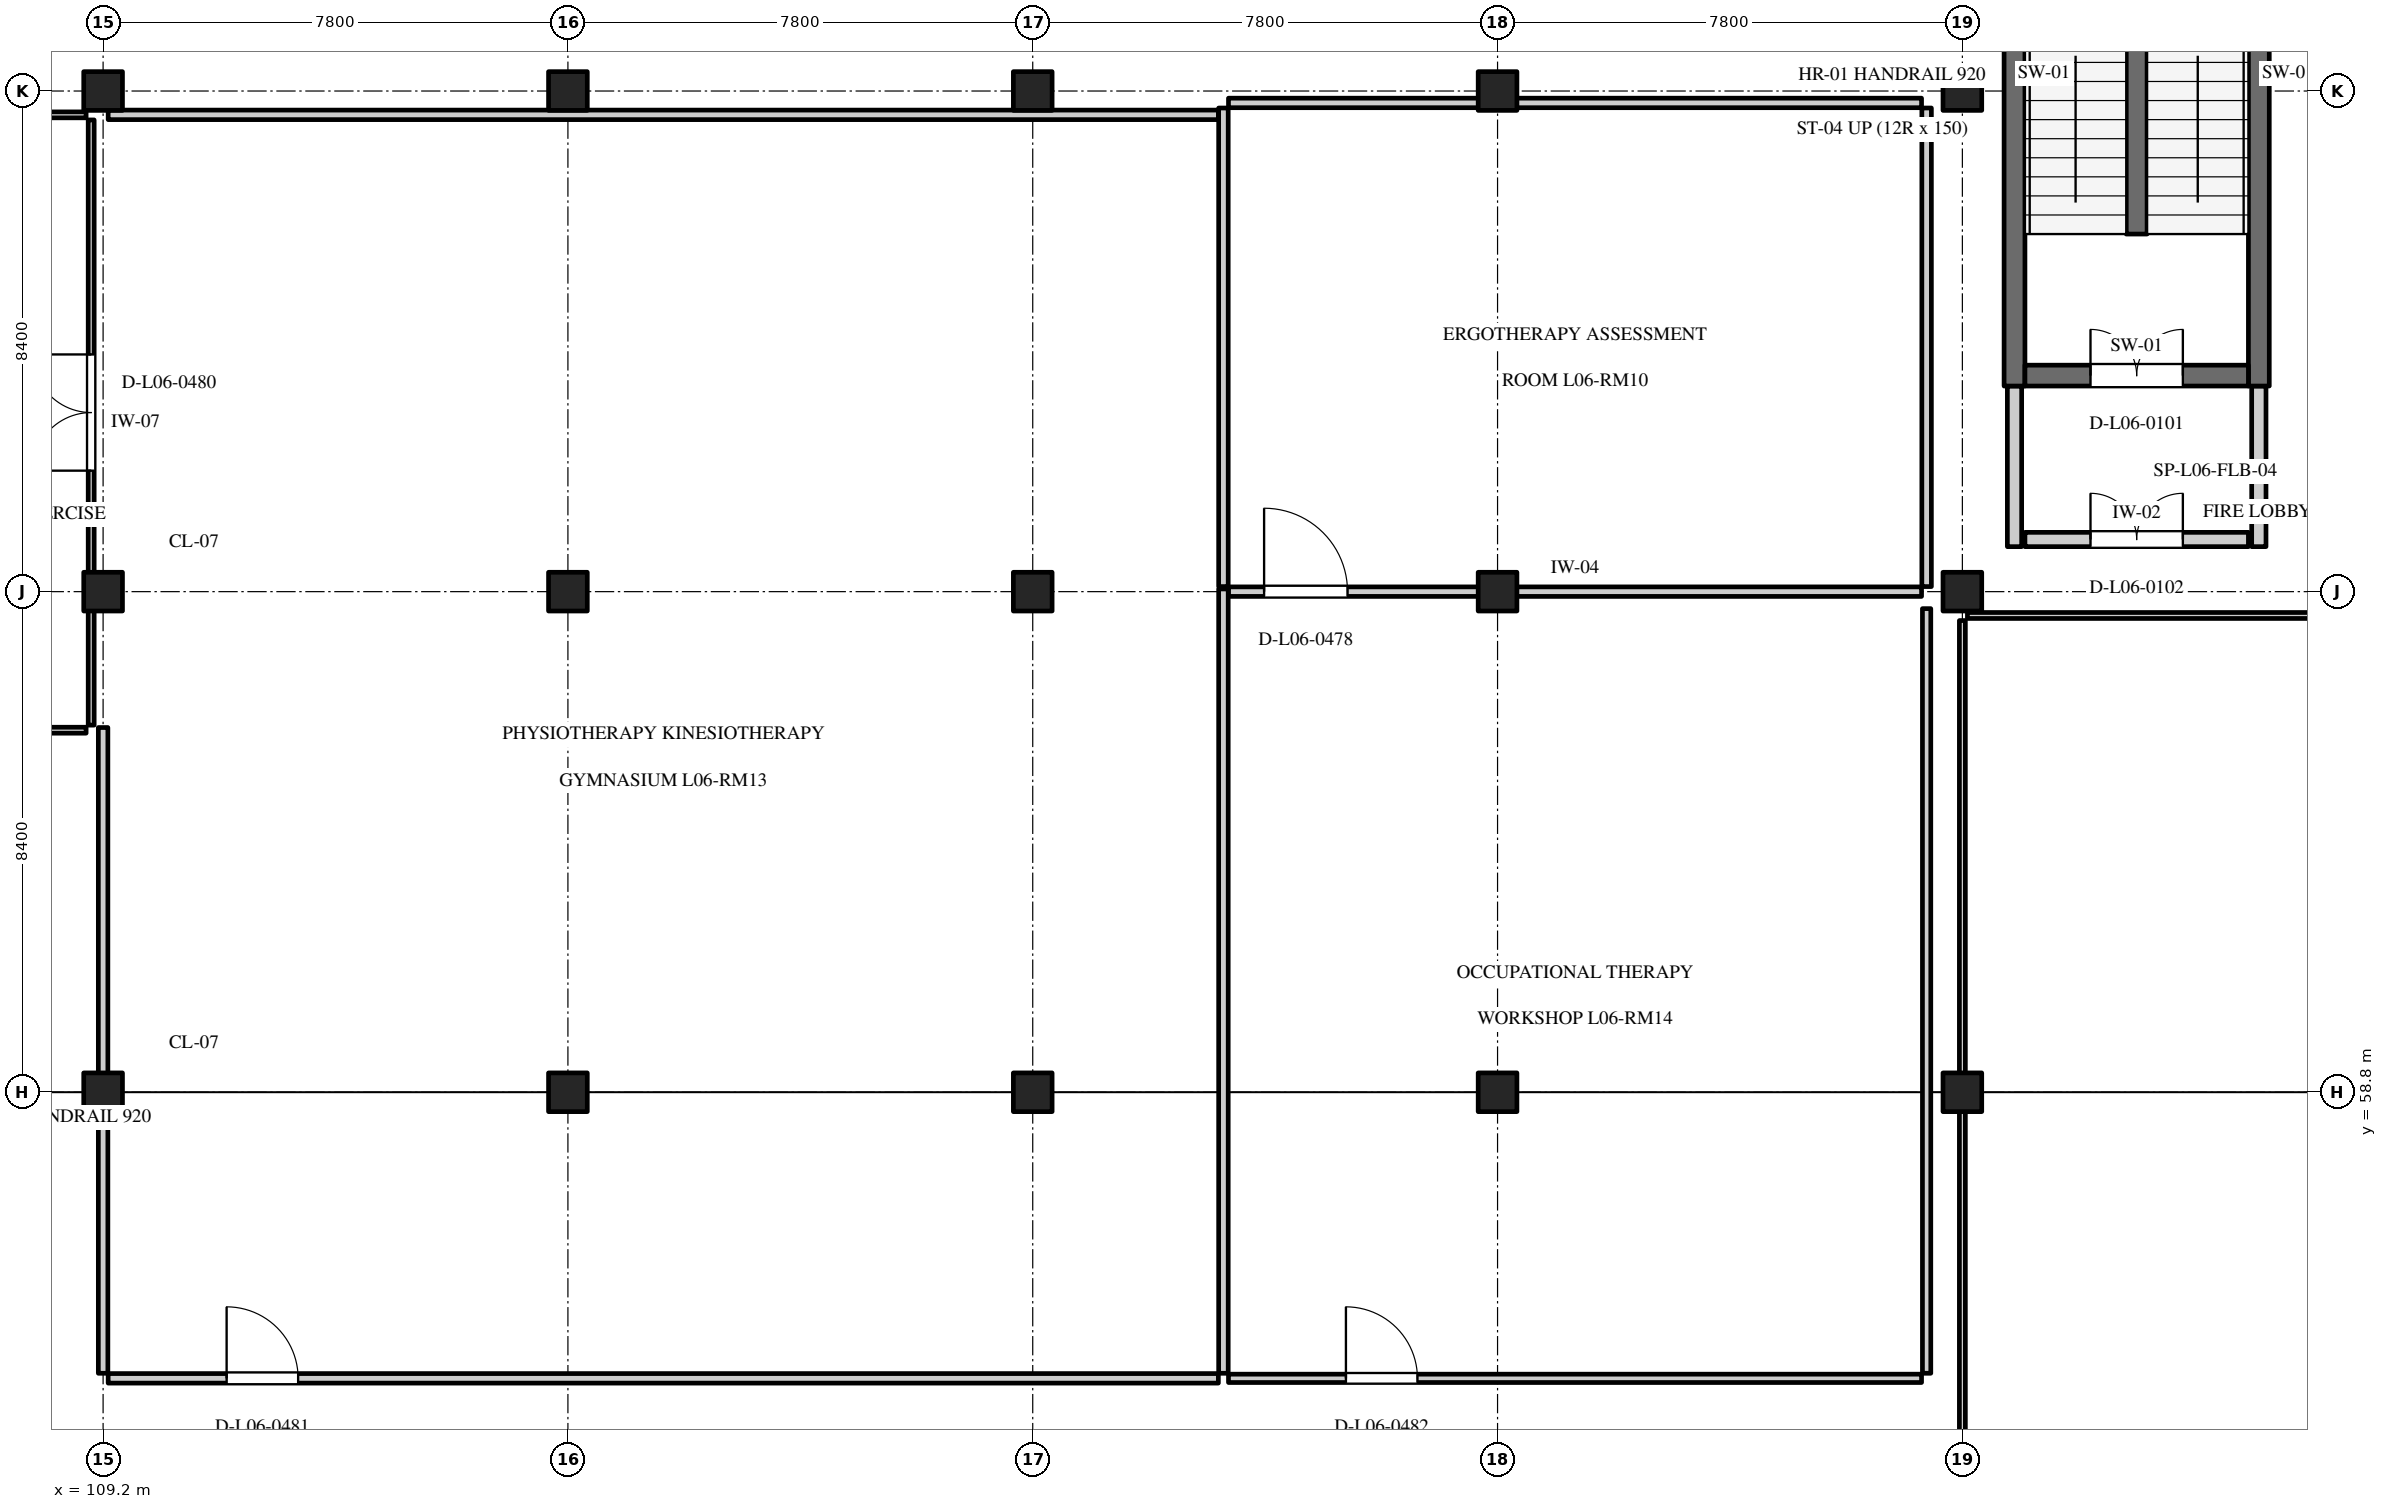
"""IFC4 building model, lengths in metres.
Left out: names, types, materials, properties, quantities, classifications, styles, units other than length and angle.
Written with IfcOpenShell. Run it as: python <this file> out.ifc"""

import sys

from ifc_helpers import new_model, si_unit, direction, frame, frame_2d, origin, origin_2d, place, context, subcontext, project, spatial, rectangle, extrude, element, fill, save


model = new_model("IFC4")
c1 = context("Model", 3, precision=1e-05, world=origin(), true_north=direction((0.0, 1.0)))
c2 = subcontext(c1, "Body", "Model", "MODEL_VIEW")
j1 = project(units=[si_unit("LENGTHUNIT", "METRE"), si_unit("PLANEANGLEUNIT", "RADIAN")], contexts=[c1])
p1 = place(None, origin())
s1 = spatial("IfcSite", under=j1, at=p1, CompositionType="ELEMENT")
p2 = place(p1, origin())
s2 = spatial("IfcBuilding", under=s1, at=p2, CompositionType="ELEMENT")
p3 = place(p2, frame((0.0, 0.0, 26.1)))
s3 = spatial("IfcBuildingStorey", under=s2, at=p3, CompositionType="ELEMENT", Elevation=26.1)
for number, where, z_axis, x_axis in (
    (1, (109.2, 58.8, 0.0), (0.0, 0.0, 1.0), (1.0, 0.0, 0.0)),
    (2, (109.2, 67.2, 0.0), (0.0, 0.0, 1.0), (1.0, 0.0, 0.0)),
    (3, (109.2, 75.6, 0.0), (0.0, 0.0, 1.0), (1.0, 0.0, 0.0)),
    (4, (117.0, 58.8, 0.0), (0.0, 0.0, 1.0), (1.0, 0.0, 0.0)),
    (5, (117.0, 67.2, 0.0), (0.0, 0.0, 1.0), (1.0, 0.0, 0.0)),
    (6, (117.0, 75.6, 0.0), (0.0, 0.0, 1.0), (1.0, 0.0, 0.0)),
    (7, (124.8, 58.8, 0.0), (0.0, 0.0, 1.0), (1.0, 0.0, 0.0)),
    (8, (124.8, 67.2, 0.0), (0.0, 0.0, 1.0), (1.0, 0.0, 0.0)),
    (9, (124.8, 75.6, 0.0), (0.0, 0.0, 1.0), (1.0, 0.0, 0.0)),
    (10, (132.6, 58.8, 0.0), (0.0, 0.0, 1.0), (1.0, 0.0, 0.0)),
    (11, (132.6, 67.2, 0.0), (0.0, 0.0, 1.0), (1.0, 0.0, 0.0)),
    (12, (132.6, 75.6, 0.0), (0.0, 0.0, 1.0), (1.0, 0.0, 0.0)),
    (13, (140.4, 58.8, 0.0), (0.0, 0.0, 1.0), (1.0, 0.0, 0.0)),
    (14, (140.4, 67.2, 0.0), (0.0, 0.0, 1.0), (1.0, 0.0, 0.0)),
    (15, (140.4, 75.6, 0.0), (0.0, 0.0, 1.0), (1.0, 0.0, 0.0)),
):
    element("IfcColumn", number, at=place(p3, frame(where, z_axis=z_axis, x_axis=x_axis)), inside=s3, PredefinedType="COLUMN", context=c2, shape_type="SweptSolid", body=[
        extrude(rectangle(XDim=0.65, YDim=0.65, at=origin_2d()), origin(), (0.0, 0.0, 1.0), 3.6),
    ])
for number, where, z_axis, x_axis in (
    (16, (141.275, 70.65, 0.0), (0.0, 0.0, 1.0), (0.0, 1.0, 0.0)),
    (17, (145.375, 70.65, 0.0), (0.0, 0.0, 1.0), (0.0, 1.0, 0.0)),
):
    element("IfcWall", number, at=place(p3, frame(where, z_axis=z_axis, x_axis=x_axis)), inside=s3, PredefinedType="SHEAR", context=c2, shape_type="SweptSolid", body=[
        extrude(rectangle(XDim=10.5, YDim=0.35, at=frame_2d((5.25, 0.0))), origin(), (0.0, 0.0, 1.0), 3.6),
    ])
p4 = place(p3, frame((141.45, 70.825, 0.0), z_axis=(0.0, 0.0, 1.0), x_axis=(1.0, 0.0, 0.0)))
e18 = element("IfcWall", 18, at=p4, inside=s3, PredefinedType="SHEAR", context=c2, shape_type="SweptSolid", body=[
    extrude(rectangle(XDim=3.75, YDim=0.35, at=frame_2d((1.875, 0.0))), origin(), (0.0, 0.0, 1.0), 3.3),
])
p5 = place(p4, frame((1.1, 0.0, 0.0)))
e19 = element("IfcOpeningElement", 19, at=p5, cuts=e18, PredefinedType="OPENING", context=c2, shape_type="SweptSolid", body=[
    extrude(rectangle(XDim=1.55, YDim=2.25, at=frame_2d((0.775, 1.125))), frame((0.0, 0.187, 0.0), z_axis=(0.0, -1.0, 0.0), x_axis=(1.0, 0.0, 0.0)), (0.0, 0.0, 1.0), 0.374),
])
for number, where, z_axis, x_axis in (
    (20, (141.275, 67.955, 0.0), (0.0, 0.0, 1.0), (0.0, 1.0, 0.0)),
    (21, (145.375, 67.955, 0.0), (0.0, 0.0, 1.0), (0.0, 1.0, 0.0)),
):
    element("IfcWall", number, at=place(p3, frame(where, z_axis=z_axis, x_axis=x_axis)), inside=s3, PredefinedType="STANDARD", context=c2, shape_type="SweptSolid", body=[
        extrude(rectangle(XDim=2.695, YDim=0.24, at=frame_2d((1.347, 0.0))), origin(), (0.0, 0.0, 1.0), 3.3),
    ])
p6 = place(p3, frame((141.45, 68.075, 0.0), z_axis=(0.0, 0.0, 1.0), x_axis=(1.0, 0.0, 0.0)))
e22 = element("IfcWall", 22, at=p6, inside=s3, PredefinedType="STANDARD", context=c2, shape_type="SweptSolid", body=[
    extrude(rectangle(XDim=3.75, YDim=0.24, at=frame_2d((1.875, 0.0))), origin(), (0.0, 0.0, 1.0), 3.3),
])
p7 = place(p6, frame((1.1, 0.0, 0.0)))
e23 = element("IfcOpeningElement", 23, at=p7, cuts=e22, PredefinedType="OPENING", context=c2, shape_type="SweptSolid", body=[
    extrude(rectangle(XDim=1.55, YDim=2.25, at=frame_2d((0.775, 1.125))), frame((0.0, 0.132, 0.0), z_axis=(0.0, -1.0, 0.0), x_axis=(1.0, 0.0, 0.0)), (0.0, 0.0, 1.0), 0.264),
])
p8 = place(p3, frame((143.325, 73.2, 0.0), z_axis=(0.0, 0.0, 1.0), x_axis=(0.0, 1.0, 0.0)))
e24 = element("IfcWall", 24, at=p8, inside=s3, PredefinedType="SHEAR", context=c2, shape_type="SweptSolid", body=[
    extrude(rectangle(XDim=3.52, YDim=0.35, at=frame_2d((1.76, 0.0))), origin(), (0.0, 0.0, 1.0), 3.6),
])
p9 = place(p3, frame((128.085, 67.2, 0.0), z_axis=(0.0, 0.0, 1.0), x_axis=(1.0, 0.0, 0.0)))
e25 = element("IfcWall", 25, at=p9, inside=s3, PredefinedType="PARTITIONING", context=c2, shape_type="SweptSolid", body=[
    extrude(rectangle(XDim=11.63, YDim=0.16, at=frame_2d((5.815, 0.0))), origin(), (0.0, 0.0, 1.0), 3.28),
])
p10 = place(p9, frame((0.597, 0.0, 0.0)))
e26 = element("IfcOpeningElement", 26, at=p10, cuts=e25, PredefinedType="OPENING", context=c2, shape_type="SweptSolid", body=[
    extrude(rectangle(XDim=1.4, YDim=2.25, at=frame_2d((0.7, 1.125))), frame((0.0, 0.092, 0.0), z_axis=(0.0, -1.0, 0.0), x_axis=(1.0, 0.0, 0.0)), (0.0, 0.0, 1.0), 0.184),
])
p11 = place(p3, frame((128.085, 75.4, 0.0), z_axis=(0.0, 0.0, 1.0), x_axis=(1.0, 0.0, 0.0)))
e27 = element("IfcWall", 27, at=p11, inside=s3, PredefinedType="PARTITIONING", context=c2, shape_type="SweptSolid", body=[
    extrude(rectangle(XDim=11.63, YDim=0.16, at=frame_2d((5.815, 0.0))), origin(), (0.0, 0.0, 1.0), 2.65),
])
for number, where, z_axis, x_axis in (
    (28, (128.0, 67.285, 0.0), (0.0, 0.0, 1.0), (0.0, 1.0, 0.0)),
    (29, (139.8, 67.285, 0.0), (0.0, 0.0, 1.0), (0.0, 1.0, 0.0)),
):
    element("IfcWall", number, at=place(p3, frame(where, z_axis=z_axis, x_axis=x_axis)), inside=s3, PredefinedType="PARTITIONING", context=c2, shape_type="SweptSolid", body=[
        extrude(rectangle(XDim=8.03, YDim=0.16, at=frame_2d((4.015, 0.0))), origin(), (0.0, 0.0, 1.0), 3.28),
    ])
p12 = place(p3, frame((109.0, 64.96, 0.0), z_axis=(0.0, 0.0, 1.0), x_axis=(0.0, 1.0, 0.0)))
e30 = element("IfcWall", 30, at=p12, inside=s3, PredefinedType="PARTITIONING", context=c2, shape_type="SweptSolid", body=[
    extrude(rectangle(XDim=10.155, YDim=0.1, at=frame_2d((5.078, 0.0))), origin(), (0.0, 0.0, 1.0), 3.28),
])
p13 = place(p12, frame((4.27, 0.0, 0.0)))
e31 = element("IfcOpeningElement", 31, at=p13, cuts=e30, PredefinedType="OPENING", context=c2, shape_type="SweptSolid", body=[
    extrude(rectangle(XDim=1.95, YDim=2.35, at=frame_2d((0.975, 1.175))), frame((0.0, 0.062, 0.0), z_axis=(0.0, -1.0, 0.0), x_axis=(1.0, 0.0, 0.0)), (0.0, 0.0, 1.0), 0.124),
])
p14 = place(p3, frame((101.485, 64.875, 0.0), z_axis=(0.0, 0.0, 1.0), x_axis=(1.0, 0.0, 0.0)))
e32 = element("IfcWall", 32, at=p14, inside=s3, PredefinedType="PARTITIONING", context=c2, shape_type="SweptSolid", body=[
    extrude(rectangle(XDim=7.43, YDim=0.1, at=frame_2d((3.715, 0.0))), origin(), (0.0, 0.0, 1.0), 3.28),
])
p15 = place(p3, frame((101.485, 75.2, 0.0), z_axis=(0.0, 0.0, 1.0), x_axis=(1.0, 0.0, 0.0)))
e33 = element("IfcWall", 33, at=p15, inside=s3, PredefinedType="PARTITIONING", context=c2, shape_type="SweptSolid", body=[
    extrude(rectangle(XDim=7.43, YDim=0.1, at=frame_2d((3.715, 0.0))), origin(), (0.0, 0.0, 1.0), 2.8),
])
p16 = place(p3, frame((109.285, 54.0, 0.0), z_axis=(0.0, 0.0, 1.0), x_axis=(1.0, 0.0, 0.0)))
e34 = element("IfcWall", 34, at=p16, inside=s3, PredefinedType="PARTITIONING", context=c2, shape_type="SweptSolid", body=[
    extrude(rectangle(XDim=18.63, YDim=0.16, at=frame_2d((9.315, 0.0))), origin(), (0.0, 0.0, 1.0), 3.28),
])
p17 = place(p16, frame((1.988, 0.0, 0.0)))
e35 = element("IfcOpeningElement", 35, at=p17, cuts=e34, PredefinedType="OPENING", context=c2, shape_type="SweptSolid", body=[
    extrude(rectangle(XDim=1.2, YDim=2.15, at=frame_2d((0.6, 1.075))), frame((0.0, 0.092, 0.0), z_axis=(0.0, -1.0, 0.0), x_axis=(1.0, 0.0, 0.0)), (0.0, 0.0, 1.0), 0.184),
])
p18 = place(p3, frame((109.285, 75.2, 0.0), z_axis=(0.0, 0.0, 1.0), x_axis=(1.0, 0.0, 0.0)))
e36 = element("IfcWall", 36, at=p18, inside=s3, PredefinedType="PARTITIONING", context=c2, shape_type="SweptSolid", body=[
    extrude(rectangle(XDim=18.63, YDim=0.16, at=frame_2d((9.315, 0.0))), origin(), (0.0, 0.0, 1.0), 2.8),
])
p19 = place(p3, frame((109.2, 54.085, 0.0), z_axis=(0.0, 0.0, 1.0), x_axis=(0.0, 1.0, 0.0)))
e37 = element("IfcWall", 37, at=p19, inside=s3, PredefinedType="PARTITIONING", context=c2, shape_type="SweptSolid", body=[
    extrude(rectangle(XDim=10.835, YDim=0.16, at=frame_2d((5.417, 0.0))), origin(), (0.0, 0.0, 1.0), 3.28),
])
p20 = place(p3, frame((128.0, 54.085, 0.0), z_axis=(0.0, 0.0, 1.0), x_axis=(0.0, 1.0, 0.0)))
e38 = element("IfcWall", 38, at=p20, inside=s3, PredefinedType="PARTITIONING", context=c2, shape_type="SweptSolid", body=[
    extrude(rectangle(XDim=13.16, YDim=0.16, at=frame_2d((6.58, 0.0))), origin(), (0.0, 0.0, 1.0), 3.28),
])
p21 = place(p3, frame((128.085, 54.0, 0.0), z_axis=(0.0, 0.0, 1.0), x_axis=(1.0, 0.0, 0.0)))
e39 = element("IfcWall", 39, at=p21, inside=s3, PredefinedType="PARTITIONING", context=c2, shape_type="SweptSolid", body=[
    extrude(rectangle(XDim=11.63, YDim=0.14, at=frame_2d((5.815, 0.0))), origin(), (0.0, 0.0, 1.0), 3.28),
])
p22 = place(p21, frame((1.971, 0.0, 0.0)))
e40 = element("IfcOpeningElement", 40, at=p22, cuts=e39, PredefinedType="OPENING", context=c2, shape_type="SweptSolid", body=[
    extrude(rectangle(XDim=1.2, YDim=2.15, at=frame_2d((0.6, 1.075))), frame((0.0, 0.082, 0.0), z_axis=(0.0, -1.0, 0.0), x_axis=(1.0, 0.0, 0.0)), (0.0, 0.0, 1.0), 0.164),
])
p23 = place(p3, frame((139.8, 54.085, 0.0), z_axis=(0.0, 0.0, 1.0), x_axis=(0.0, 1.0, 0.0)))
e41 = element("IfcWall", 41, at=p23, inside=s3, PredefinedType="PARTITIONING", context=c2, shape_type="SweptSolid", body=[
    extrude(rectangle(XDim=12.83, YDim=0.14, at=frame_2d((6.415, 0.0))), origin(), (0.0, 0.0, 1.0), 3.28),
])
p24 = place(p3, frame((140.4, 33.685, 0.0), z_axis=(0.0, 0.0, 1.0), x_axis=(0.0, 1.0, 0.0)))
e42 = element("IfcWall", 42, at=p24, inside=s3, PredefinedType="PARTITIONING", context=c2, shape_type="SweptSolid", body=[
    extrude(rectangle(XDim=33.03, YDim=0.1, at=frame_2d((16.515, 0.0))), origin(), (0.0, 0.0, 1.0), 3.28),
])
p25 = place(p24, frame((2.693, 0.0, 0.0)))
e43 = element("IfcOpeningElement", 43, at=p25, cuts=e42, PredefinedType="OPENING", context=c2, shape_type="SweptSolid", body=[
    extrude(rectangle(XDim=1.12, YDim=2.2, at=frame_2d((0.56, 1.1))), frame((0.0, 0.062, 0.0), z_axis=(0.0, -1.0, 0.0), x_axis=(1.0, 0.0, 0.0)), (0.0, 0.0, 1.0), 0.124),
])
p26 = place(p3, frame((140.485, 66.8, 0.0), z_axis=(0.0, 0.0, 1.0), x_axis=(1.0, 0.0, 0.0)))
e44 = element("IfcWall", 44, at=p26, inside=s3, PredefinedType="PARTITIONING", context=c2, shape_type="SweptSolid", body=[
    extrude(rectangle(XDim=7.63, YDim=0.1, at=frame_2d((3.815, 0.0))), origin(), (0.0, 0.0, 1.0), 3.28),
])
p27 = place(p5, origin())
e45 = element("IfcDoor", 45, at=p27, inside=s3, OperationType="DOUBLE_DOOR_SINGLE_SWING", PredefinedType="DOOR", context=c2, shape_type="SweptSolid", body=[
    extrude(rectangle(XDim=1.55, YDim=2.25, at=frame_2d((0.775, 1.125))), frame((0.0, 0.025, 0.0), z_axis=(0.0, -1.0, 0.0), x_axis=(1.0, 0.0, 0.0)), (0.0, 0.0, 1.0), 0.05),
])
fill(e19, e45)
p28 = place(p7, origin())
e46 = element("IfcDoor", 46, at=p28, inside=s3, OperationType="DOUBLE_DOOR_SINGLE_SWING", PredefinedType="DOOR", context=c2, shape_type="SweptSolid", body=[
    extrude(rectangle(XDim=1.55, YDim=2.25, at=frame_2d((0.775, 1.125))), frame((0.0, 0.025, 0.0), z_axis=(0.0, -1.0, 0.0), x_axis=(1.0, 0.0, 0.0)), (0.0, 0.0, 1.0), 0.05),
])
fill(e23, e46)
p29 = place(p10, origin())
e47 = element("IfcDoor", 47, at=p29, inside=s3, OperationType="SINGLE_SWING_LEFT", PredefinedType="DOOR", context=c2, shape_type="SweptSolid", body=[
    extrude(rectangle(XDim=1.4, YDim=2.25, at=frame_2d((0.7, 1.125))), frame((0.0, 0.025, 0.0), z_axis=(0.0, -1.0, 0.0), x_axis=(1.0, 0.0, 0.0)), (0.0, 0.0, 1.0), 0.05),
])
fill(e26, e47)
p30 = place(p13, origin())
e48 = element("IfcDoor", 48, at=p30, inside=s3, OperationType="DOUBLE_DOOR_SINGLE_SWING", PredefinedType="DOOR", context=c2, shape_type="SweptSolid", body=[
    extrude(rectangle(XDim=1.95, YDim=2.35, at=frame_2d((0.975, 1.175))), frame((0.0, 0.025, 0.0), z_axis=(0.0, -1.0, 0.0), x_axis=(1.0, 0.0, 0.0)), (0.0, 0.0, 1.0), 0.05),
])
fill(e31, e48)
p31 = place(p17, origin())
e49 = element("IfcDoor", 49, at=p31, inside=s3, OperationType="SINGLE_SWING_LEFT", PredefinedType="DOOR", context=c2, shape_type="SweptSolid", body=[
    extrude(rectangle(XDim=1.2, YDim=2.15, at=frame_2d((0.6, 1.075))), frame((0.0, 0.025, 0.0), z_axis=(0.0, -1.0, 0.0), x_axis=(1.0, 0.0, 0.0)), (0.0, 0.0, 1.0), 0.05),
])
fill(e35, e49)
p32 = place(p22, origin())
e50 = element("IfcDoor", 50, at=p32, inside=s3, OperationType="SINGLE_SWING_LEFT", PredefinedType="DOOR", context=c2, shape_type="SweptSolid", body=[
    extrude(rectangle(XDim=1.2, YDim=2.15, at=frame_2d((0.6, 1.075))), frame((0.0, 0.025, 0.0), z_axis=(0.0, -1.0, 0.0), x_axis=(1.0, 0.0, 0.0)), (0.0, 0.0, 1.0), 0.05),
])
fill(e40, e50)
save(model, sys.argv[1])
